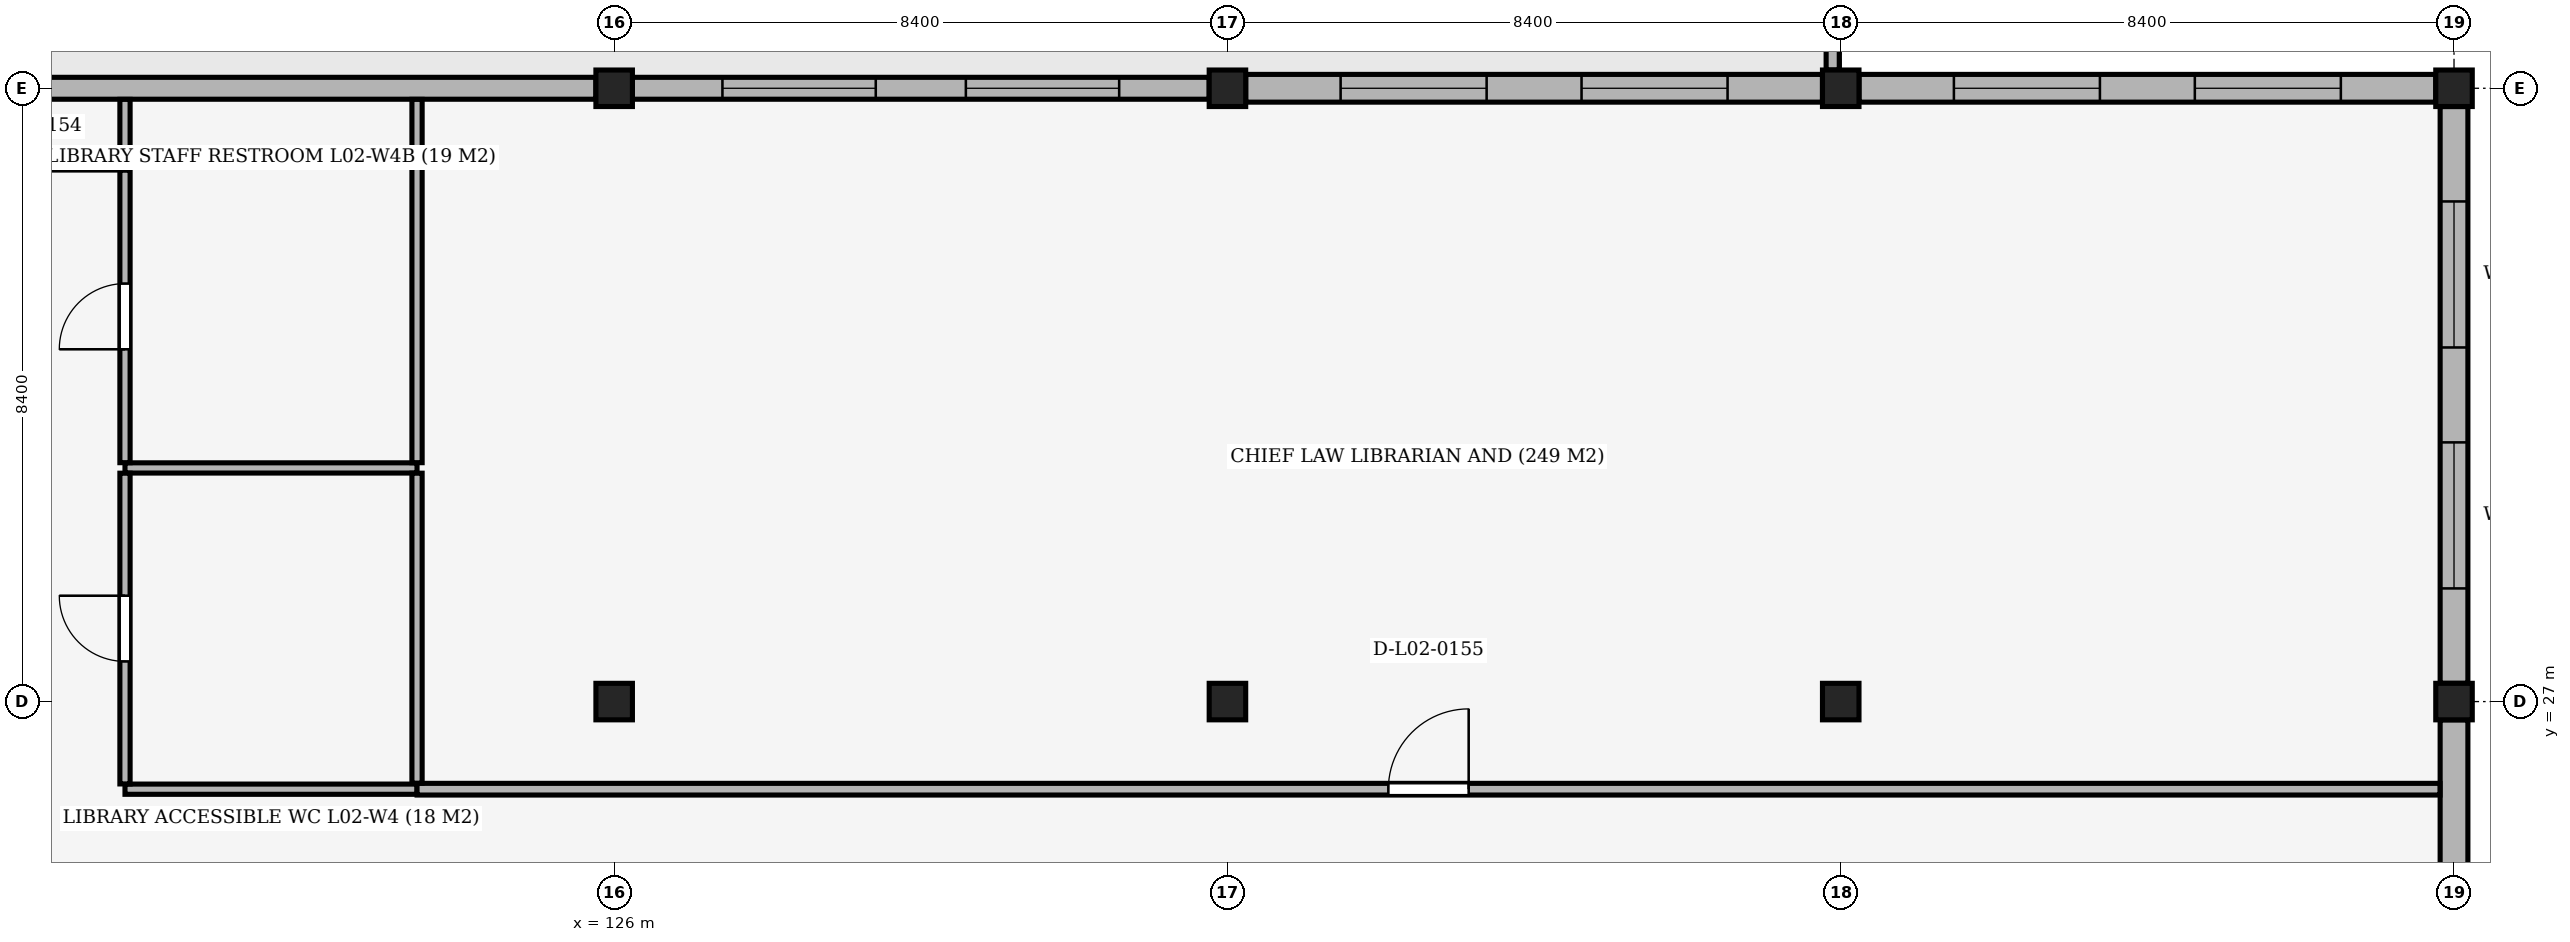
"""IFC4 building model, lengths in metres.
Left out: names, types, materials, properties, quantities, classifications, styles, units other than length and angle.
Written with IfcOpenShell. Run it as: python <this file> out.ifc"""

import sys

from ifc_helpers import new_model, si_unit, direction, frame, frame_2d, origin, origin_2d, place, context, subcontext, project, spatial, rectangle, extrude, element, fill, save


model = new_model("IFC4")
c1 = context("Model", 3, precision=1e-05, world=origin(), true_north=direction((0.0, 1.0)))
c2 = subcontext(c1, "Body", "Model", "MODEL_VIEW")
j1 = project(units=[si_unit("LENGTHUNIT", "METRE"), si_unit("PLANEANGLEUNIT", "RADIAN")], contexts=[c1])
p1 = place(None, origin())
s1 = spatial("IfcSite", under=j1, at=p1, CompositionType="ELEMENT")
p2 = place(p1, origin())
s2 = spatial("IfcBuilding", under=s1, at=p2, CompositionType="ELEMENT")
p3 = place(p2, frame((0.0, 0.0, 10.2)))
s3 = spatial("IfcBuildingStorey", under=s2, at=p3, CompositionType="ELEMENT", Elevation=10.2)
for number, where, z_axis, x_axis in (
    (1, (126.0, 27.0, 0.0), (0.0, 0.0, 1.0), (1.0, 0.0, 0.0)),
    (2, (126.0, 35.4, 0.0), (0.0, 0.0, 1.0), (1.0, 0.0, 0.0)),
    (3, (134.4, 27.0, 0.0), (0.0, 0.0, 1.0), (1.0, 0.0, 0.0)),
    (4, (134.4, 35.4, 0.0), (0.0, 0.0, 1.0), (1.0, 0.0, 0.0)),
    (5, (142.8, 27.0, 0.0), (0.0, 0.0, 1.0), (1.0, 0.0, 0.0)),
    (6, (142.8, 35.4, 0.0), (0.0, 0.0, 1.0), (1.0, 0.0, 0.0)),
    (7, (151.2, 27.0, 0.0), (0.0, 0.0, 1.0), (1.0, 0.0, 0.0)),
    (8, (151.2, 35.4, 0.0), (0.0, 0.0, 1.0), (1.0, 0.0, 0.0)),
):
    element("IfcColumn", number, at=place(p3, frame(where, z_axis=z_axis, x_axis=x_axis)), inside=s3, PredefinedType="COLUMN", context=c2, shape_type="SweptSolid", body=[
        extrude(rectangle(XDim=0.5, YDim=0.5, at=origin_2d()), origin(), (0.0, 0.0, 1.0), 5.1),
    ])
p4 = place(p3, frame((117.85, 35.4, 0.0), z_axis=(0.0, 0.0, 1.0), x_axis=(1.0, 0.0, 0.0)))
e9 = element("IfcWall", 9, at=p4, inside=s3, PredefinedType="SOLIDWALL", context=c2, shape_type="SweptSolid", body=[
    extrude(rectangle(XDim=7.9, YDim=0.3, at=frame_2d((3.95, 0.0))), origin(), (0.0, 0.0, 1.0), 4.12),
])
p5 = place(p3, frame((126.25, 35.4, 0.0), z_axis=(0.0, 0.0, 1.0), x_axis=(1.0, 0.0, 0.0)))
e10 = element("IfcWall", 10, at=p5, inside=s3, PredefinedType="SOLIDWALL", context=c2, shape_type="SweptSolid", body=[
    extrude(rectangle(XDim=7.9, YDim=0.3, at=frame_2d((3.95, 0.0))), origin(), (0.0, 0.0, 1.0), 4.12),
])
p6 = place(p5, frame((1.233, 0.0, 0.9)))
e11 = element("IfcOpeningElement", 11, at=p6, cuts=e10, PredefinedType="OPENING", context=c2, shape_type="SweptSolid", body=[
    extrude(rectangle(XDim=2.1, YDim=2.1, at=frame_2d((1.05, 1.05))), frame((0.0, 0.165, 0.0), z_axis=(0.0, -1.0, 0.0), x_axis=(1.0, 0.0, 0.0)), (0.0, 0.0, 1.0), 0.33),
])
p7 = place(p5, frame((4.567, 0.0, 0.9)))
e12 = element("IfcOpeningElement", 12, at=p7, cuts=e10, PredefinedType="OPENING", context=c2, shape_type="SweptSolid", body=[
    extrude(rectangle(XDim=2.1, YDim=2.1, at=frame_2d((1.05, 1.05))), frame((0.0, 0.165, 0.0), z_axis=(0.0, -1.0, 0.0), x_axis=(1.0, 0.0, 0.0)), (0.0, 0.0, 1.0), 0.33),
])
p8 = place(p3, frame((134.65, 35.4, 0.0), z_axis=(0.0, 0.0, 1.0), x_axis=(1.0, 0.0, 0.0)))
e13 = element("IfcWall", 13, at=p8, inside=s3, PredefinedType="SOLIDWALL", context=c2, shape_type="SweptSolid", body=[
    extrude(rectangle(XDim=7.9, YDim=0.38, at=frame_2d((3.95, 0.0))), origin(), (0.0, 0.0, 1.0), 4.12),
])
p9 = place(p8, frame((1.3, 0.0, 2.1)))
e14 = element("IfcOpeningElement", 14, at=p9, cuts=e13, PredefinedType="OPENING", context=c2, shape_type="SweptSolid", body=[
    extrude(rectangle(XDim=2.0, YDim=1.2, at=frame_2d((1.0, 0.6))), frame((0.0, 0.205, 0.0), z_axis=(0.0, -1.0, 0.0), x_axis=(1.0, 0.0, 0.0)), (0.0, 0.0, 1.0), 0.41),
])
p10 = place(p8, frame((4.6, 0.0, 2.1)))
e15 = element("IfcOpeningElement", 15, at=p10, cuts=e13, PredefinedType="OPENING", context=c2, shape_type="SweptSolid", body=[
    extrude(rectangle(XDim=2.0, YDim=1.2, at=frame_2d((1.0, 0.6))), frame((0.0, 0.205, 0.0), z_axis=(0.0, -1.0, 0.0), x_axis=(1.0, 0.0, 0.0)), (0.0, 0.0, 1.0), 0.41),
])
p11 = place(p3, frame((143.05, 35.4, 0.0), z_axis=(0.0, 0.0, 1.0), x_axis=(1.0, 0.0, 0.0)))
e16 = element("IfcWall", 16, at=p11, inside=s3, PredefinedType="SOLIDWALL", context=c2, shape_type="SweptSolid", body=[
    extrude(rectangle(XDim=7.9, YDim=0.38, at=frame_2d((3.95, 0.0))), origin(), (0.0, 0.0, 1.0), 4.12),
])
p12 = place(p11, frame((1.3, 0.0, 2.1)))
e17 = element("IfcOpeningElement", 17, at=p12, cuts=e16, PredefinedType="OPENING", context=c2, shape_type="SweptSolid", body=[
    extrude(rectangle(XDim=2.0, YDim=1.2, at=frame_2d((1.0, 0.6))), frame((0.0, 0.205, 0.0), z_axis=(0.0, -1.0, 0.0), x_axis=(1.0, 0.0, 0.0)), (0.0, 0.0, 1.0), 0.41),
])
p13 = place(p11, frame((4.6, 0.0, 2.1)))
e18 = element("IfcOpeningElement", 18, at=p13, cuts=e16, PredefinedType="OPENING", context=c2, shape_type="SweptSolid", body=[
    extrude(rectangle(XDim=2.0, YDim=1.2, at=frame_2d((1.0, 0.6))), frame((0.0, 0.205, 0.0), z_axis=(0.0, -1.0, 0.0), x_axis=(1.0, 0.0, 0.0)), (0.0, 0.0, 1.0), 0.41),
])
p14 = place(p3, frame((151.2, 35.15, 0.0), z_axis=(0.0, 0.0, 1.0), x_axis=(0.0, -1.0, 0.0)))
e19 = element("IfcWall", 19, at=p14, inside=s3, PredefinedType="SOLIDWALL", context=c2, shape_type="SweptSolid", body=[
    extrude(rectangle(XDim=7.9, YDim=0.38, at=frame_2d((3.95, 0.0))), origin(), (0.0, 0.0, 1.0), 4.12),
])
p15 = place(p14, frame((1.3, 0.0, 2.1)))
e20 = element("IfcOpeningElement", 20, at=p15, cuts=e19, PredefinedType="OPENING", context=c2, shape_type="SweptSolid", body=[
    extrude(rectangle(XDim=2.0, YDim=1.2, at=frame_2d((1.0, 0.6))), frame((0.0, 0.205, 0.0), z_axis=(0.0, -1.0, 0.0), x_axis=(1.0, 0.0, 0.0)), (0.0, 0.0, 1.0), 0.41),
])
p16 = place(p14, frame((4.6, 0.0, 2.1)))
e21 = element("IfcOpeningElement", 21, at=p16, cuts=e19, PredefinedType="OPENING", context=c2, shape_type="SweptSolid", body=[
    extrude(rectangle(XDim=2.0, YDim=1.2, at=frame_2d((1.0, 0.6))), frame((0.0, 0.205, 0.0), z_axis=(0.0, -1.0, 0.0), x_axis=(1.0, 0.0, 0.0)), (0.0, 0.0, 1.0), 0.41),
])
p17 = place(p3, frame((151.2, 26.75, 0.0), z_axis=(0.0, 0.0, 1.0), x_axis=(0.0, -1.0, 0.0)))
e22 = element("IfcWall", 22, at=p17, inside=s3, PredefinedType="SOLIDWALL", context=c2, shape_type="SweptSolid", body=[
    extrude(rectangle(XDim=4.3, YDim=0.38, at=frame_2d((2.15, 0.0))), origin(), (0.0, 0.0, 1.0), 3.77),
])
p18 = place(p3, frame((142.69, 35.65, 0.0), z_axis=(0.0, 0.0, 1.0), x_axis=(0.0, 1.0, 0.0)))
e23 = element("IfcWall", 23, at=p18, inside=s3, PredefinedType="PARAPET", context=c2, shape_type="SweptSolid", body=[
    extrude(rectangle(XDim=5.04, YDim=0.18, at=frame_2d((2.52, 0.0))), origin(), (0.0, 0.0, 1.0), 1.15),
])
p19 = place(p3, frame((119.3, 25.8, 0.0), z_axis=(0.0, 0.0, 1.0), x_axis=(1.0, 0.0, 0.0)))
e24 = element("IfcWall", 24, at=p19, inside=s3, PredefinedType="PARTITIONING", context=c2, shape_type="SweptSolid", body=[
    extrude(rectangle(XDim=4.0, YDim=0.14, at=frame_2d((2.0, 0.0))), origin(), (0.0, 0.0, 1.0), 4.82),
])
p20 = place(p3, frame((123.3, 25.8, 0.0), z_axis=(0.0, 0.0, 1.0), x_axis=(1.0, 0.0, 0.0)))
e25 = element("IfcWall", 25, at=p20, inside=s3, PredefinedType="PARTITIONING", context=c2, shape_type="SweptSolid", body=[
    extrude(rectangle(XDim=27.708, YDim=0.16, at=frame_2d((13.854, 0.0))), origin(), (0.0, 0.0, 1.0), 4.27),
])
p21 = place(p20, frame((13.304, 0.0, 0.0)))
e26 = element("IfcOpeningElement", 26, at=p21, cuts=e25, PredefinedType="OPENING", context=c2, shape_type="SweptSolid", body=[
    extrude(rectangle(XDim=1.1, YDim=2.2, at=frame_2d((0.55, 1.1))), frame((0.0, 0.095, 0.0), z_axis=(0.0, -1.0, 0.0), x_axis=(1.0, 0.0, 0.0)), (0.0, 0.0, 1.0), 0.19),
])
p22 = place(p3, frame((119.3, 30.2, 0.0), z_axis=(0.0, 0.0, 1.0), x_axis=(1.0, 0.0, 0.0)))
e27 = element("IfcWall", 27, at=p22, inside=s3, PredefinedType="PARTITIONING", context=c2, shape_type="SweptSolid", body=[
    extrude(rectangle(XDim=4.0, YDim=0.14, at=frame_2d((2.0, 0.0))), origin(), (0.0, 0.0, 1.0), 4.82),
])
p23 = place(p3, frame((116.5, 34.4, 0.0), z_axis=(0.0, 0.0, 1.0), x_axis=(1.0, 0.0, 0.0)))
e28 = element("IfcWall", 28, at=p23, inside=s3, PredefinedType="PARTITIONING", context=c2, shape_type="SweptSolid", body=[
    extrude(rectangle(XDim=2.8, YDim=0.24, at=frame_2d((1.4, 0.0))), origin(), (0.0, 0.0, 1.0), 4.12),
])
p24 = place(p3, frame((119.3, 25.872, 0.0), z_axis=(0.0, 0.0, 1.0), x_axis=(0.0, 1.0, 0.0)))
e29 = element("IfcWall", 29, at=p24, inside=s3, PredefinedType="PARTITIONING", context=c2, shape_type="SweptSolid", body=[
    extrude(rectangle(XDim=4.256, YDim=0.14, at=frame_2d((2.128, 0.0))), origin(), (0.0, 0.0, 1.0), 4.12),
])
p25 = place(p24, frame((1.678, 0.0, 0.0)))
e30 = element("IfcOpeningElement", 30, at=p25, cuts=e29, PredefinedType="OPENING", context=c2, shape_type="SweptSolid", body=[
    extrude(rectangle(XDim=0.9, YDim=2.1, at=frame_2d((0.45, 1.05))), frame((0.0, 0.085, 0.0), z_axis=(0.0, -1.0, 0.0), x_axis=(1.0, 0.0, 0.0)), (0.0, 0.0, 1.0), 0.17),
])
p26 = place(p3, frame((119.3, 30.272, 0.0), z_axis=(0.0, 0.0, 1.0), x_axis=(0.0, 1.0, 0.0)))
e31 = element("IfcWall", 31, at=p26, inside=s3, PredefinedType="PARTITIONING", context=c2, shape_type="SweptSolid", body=[
    extrude(rectangle(XDim=4.006, YDim=0.14, at=frame_2d((2.003, 0.0))), origin(), (0.0, 0.0, 1.0), 4.37),
])
p27 = place(p26, frame((1.553, 0.0, 0.0)))
e32 = element("IfcOpeningElement", 32, at=p27, cuts=e31, PredefinedType="OPENING", context=c2, shape_type="SweptSolid", body=[
    extrude(rectangle(XDim=0.9, YDim=2.1, at=frame_2d((0.45, 1.05))), frame((0.0, 0.085, 0.0), z_axis=(0.0, -1.0, 0.0), x_axis=(1.0, 0.0, 0.0)), (0.0, 0.0, 1.0), 0.17),
])
p28 = place(p3, frame((119.3, 34.522, 0.0), z_axis=(0.0, 0.0, 1.0), x_axis=(0.0, 1.0, 0.0)))
e33 = element("IfcWall", 33, at=p28, inside=s3, PredefinedType="PARTITIONING", context=c2, shape_type="SweptSolid", body=[
    extrude(rectangle(XDim=0.726, YDim=0.14, at=frame_2d((0.363, 0.0))), origin(), (0.0, 0.0, 1.0), 4.12),
])
p29 = place(p3, frame((123.3, 25.882, 0.0), z_axis=(0.0, 0.0, 1.0), x_axis=(0.0, 1.0, 0.0)))
e34 = element("IfcWall", 34, at=p29, inside=s3, PredefinedType="PARTITIONING", context=c2, shape_type="SweptSolid", body=[
    extrude(rectangle(XDim=4.246, YDim=0.14, at=frame_2d((2.123, 0.0))), origin(), (0.0, 0.0, 1.0), 4.12),
])
p30 = place(p3, frame((123.3, 30.272, 0.0), z_axis=(0.0, 0.0, 1.0), x_axis=(0.0, 1.0, 0.0)))
e35 = element("IfcWall", 35, at=p30, inside=s3, PredefinedType="PARTITIONING", context=c2, shape_type="SweptSolid", body=[
    extrude(rectangle(XDim=4.976, YDim=0.14, at=frame_2d((2.488, 0.0))), origin(), (0.0, 0.0, 1.0), 4.12),
])
p31 = place(p6, origin())
e36 = element("IfcWindow", 36, at=p31, inside=s3, PartitioningType="SINGLE_PANEL", PredefinedType="WINDOW", context=c2, shape_type="SweptSolid", body=[
    extrude(rectangle(XDim=2.1, YDim=2.1, at=frame_2d((1.05, 1.05))), frame((0.0, 0.03, 0.0), z_axis=(0.0, -1.0, 0.0), x_axis=(1.0, 0.0, 0.0)), (0.0, 0.0, 1.0), 0.06),
])
fill(e11, e36)
p32 = place(p7, origin())
e37 = element("IfcWindow", 37, at=p32, inside=s3, PartitioningType="SINGLE_PANEL", PredefinedType="WINDOW", context=c2, shape_type="SweptSolid", body=[
    extrude(rectangle(XDim=2.1, YDim=2.1, at=frame_2d((1.05, 1.05))), frame((0.0, 0.03, 0.0), z_axis=(0.0, -1.0, 0.0), x_axis=(1.0, 0.0, 0.0)), (0.0, 0.0, 1.0), 0.06),
])
fill(e12, e37)
p33 = place(p9, origin())
e38 = element("IfcWindow", 38, at=p33, inside=s3, PartitioningType="SINGLE_PANEL", PredefinedType="WINDOW", context=c2, shape_type="SweptSolid", body=[
    extrude(rectangle(XDim=2.0, YDim=1.2, at=frame_2d((1.0, 0.6))), frame((0.0, 0.03, 0.0), z_axis=(0.0, -1.0, 0.0), x_axis=(1.0, 0.0, 0.0)), (0.0, 0.0, 1.0), 0.06),
])
fill(e14, e38)
p34 = place(p10, origin())
e39 = element("IfcWindow", 39, at=p34, inside=s3, PartitioningType="SINGLE_PANEL", PredefinedType="WINDOW", context=c2, shape_type="SweptSolid", body=[
    extrude(rectangle(XDim=2.0, YDim=1.2, at=frame_2d((1.0, 0.6))), frame((0.0, 0.03, 0.0), z_axis=(0.0, -1.0, 0.0), x_axis=(1.0, 0.0, 0.0)), (0.0, 0.0, 1.0), 0.06),
])
fill(e15, e39)
p35 = place(p12, origin())
e40 = element("IfcWindow", 40, at=p35, inside=s3, PartitioningType="SINGLE_PANEL", PredefinedType="WINDOW", context=c2, shape_type="SweptSolid", body=[
    extrude(rectangle(XDim=2.0, YDim=1.2, at=frame_2d((1.0, 0.6))), frame((0.0, 0.03, 0.0), z_axis=(0.0, -1.0, 0.0), x_axis=(1.0, 0.0, 0.0)), (0.0, 0.0, 1.0), 0.06),
])
fill(e17, e40)
p36 = place(p13, origin())
e41 = element("IfcWindow", 41, at=p36, inside=s3, PartitioningType="SINGLE_PANEL", PredefinedType="WINDOW", context=c2, shape_type="SweptSolid", body=[
    extrude(rectangle(XDim=2.0, YDim=1.2, at=frame_2d((1.0, 0.6))), frame((0.0, 0.03, 0.0), z_axis=(0.0, -1.0, 0.0), x_axis=(1.0, 0.0, 0.0)), (0.0, 0.0, 1.0), 0.06),
])
fill(e18, e41)
p37 = place(p15, origin())
e42 = element("IfcWindow", 42, at=p37, inside=s3, PartitioningType="SINGLE_PANEL", PredefinedType="WINDOW", context=c2, shape_type="SweptSolid", body=[
    extrude(rectangle(XDim=2.0, YDim=1.2, at=frame_2d((1.0, 0.6))), frame((0.0, 0.03, 0.0), z_axis=(0.0, -1.0, 0.0), x_axis=(1.0, 0.0, 0.0)), (0.0, 0.0, 1.0), 0.06),
])
fill(e20, e42)
p38 = place(p16, origin())
e43 = element("IfcWindow", 43, at=p38, inside=s3, PartitioningType="SINGLE_PANEL", PredefinedType="WINDOW", context=c2, shape_type="SweptSolid", body=[
    extrude(rectangle(XDim=2.0, YDim=1.2, at=frame_2d((1.0, 0.6))), frame((0.0, 0.03, 0.0), z_axis=(0.0, -1.0, 0.0), x_axis=(1.0, 0.0, 0.0)), (0.0, 0.0, 1.0), 0.06),
])
fill(e21, e43)
p39 = place(p25, origin())
e44 = element("IfcDoor", 44, at=p39, inside=s3, OperationType="SINGLE_SWING_RIGHT", PredefinedType="DOOR", context=c2, shape_type="SweptSolid", body=[
    extrude(rectangle(XDim=0.9, YDim=2.1, at=frame_2d((0.45, 1.05))), frame((0.0, 0.025, 0.0), z_axis=(0.0, -1.0, 0.0), x_axis=(1.0, 0.0, 0.0)), (0.0, 0.0, 1.0), 0.05),
])
fill(e30, e44)
p40 = place(p27, origin())
e45 = element("IfcDoor", 45, at=p40, inside=s3, OperationType="SINGLE_SWING_LEFT", PredefinedType="DOOR", context=c2, shape_type="SweptSolid", body=[
    extrude(rectangle(XDim=0.9, YDim=2.1, at=frame_2d((0.45, 1.05))), frame((0.0, 0.025, 0.0), z_axis=(0.0, -1.0, 0.0), x_axis=(1.0, 0.0, 0.0)), (0.0, 0.0, 1.0), 0.05),
])
fill(e32, e45)
p41 = place(p21, origin())
e46 = element("IfcDoor", 46, at=p41, inside=s3, OperationType="SINGLE_SWING_RIGHT", PredefinedType="DOOR", context=c2, shape_type="SweptSolid", body=[
    extrude(rectangle(XDim=1.1, YDim=2.2, at=frame_2d((0.55, 1.1))), frame((0.0, 0.025, 0.0), z_axis=(0.0, -1.0, 0.0), x_axis=(1.0, 0.0, 0.0)), (0.0, 0.0, 1.0), 0.05),
])
fill(e26, e46)
save(model, sys.argv[1])
